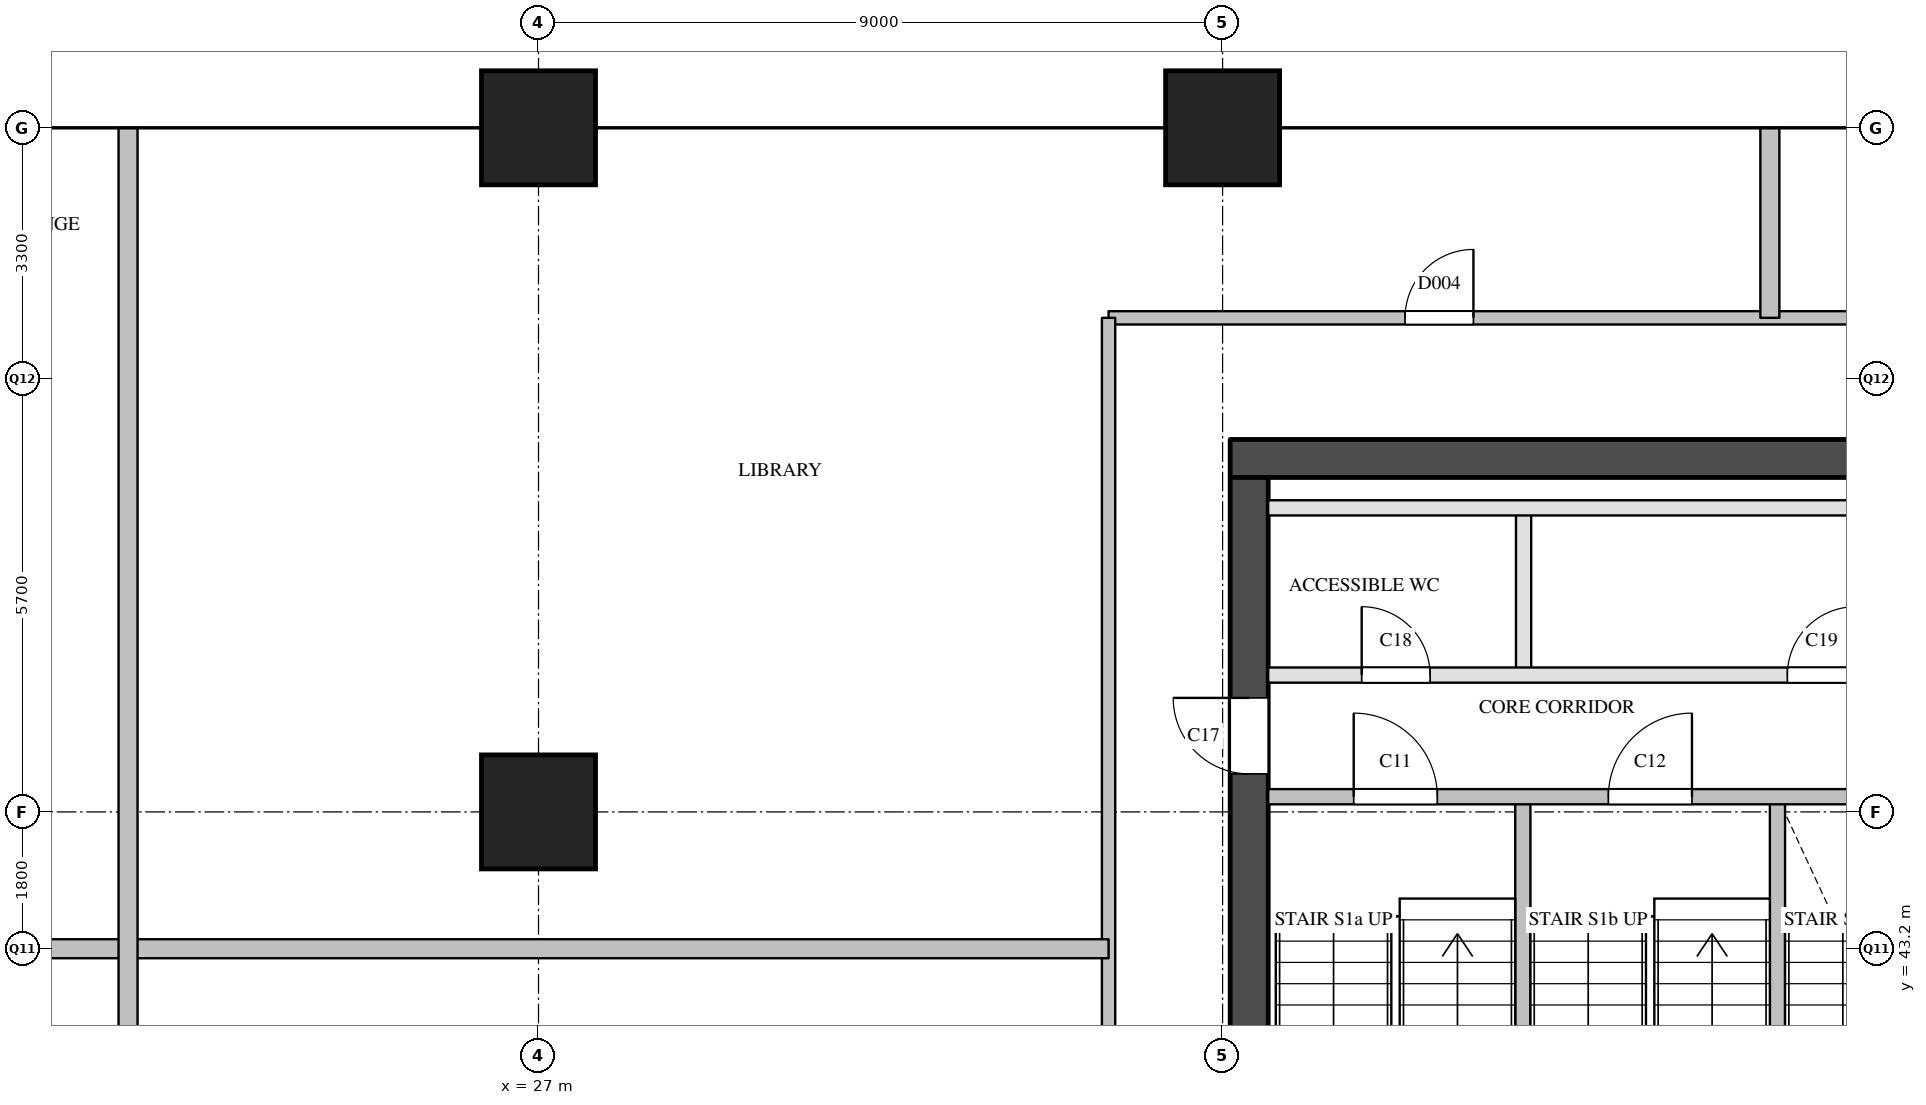
"""IFC4 building model, lengths in metres.
Left out: names, types, materials, properties, quantities, classifications, styles, units other than length and angle.
Written with IfcOpenShell. Run it as: python <this file> out.ifc"""

import sys

from ifc_helpers import new_model, si_unit, direction, frame, frame_2d, origin, origin_2d, place, context, subcontext, project, spatial, rectangle, extrude, element, fill, save


model = new_model("IFC4")
c1 = context("Model", 3, precision=1e-05, world=origin(), true_north=direction((0.0, 1.0)))
c2 = subcontext(c1, "Body", "Model", "MODEL_VIEW")
j1 = project(units=[si_unit("LENGTHUNIT", "METRE"), si_unit("PLANEANGLEUNIT", "RADIAN")], contexts=[c1])
p1 = place(None, origin())
s1 = spatial("IfcSite", under=j1, at=p1, CompositionType="ELEMENT")
p2 = place(p1, origin())
s2 = spatial("IfcBuilding", under=s1, at=p2, CompositionType="ELEMENT")
p3 = place(p2, frame((0.0, 0.0, 181.7)))
s3 = spatial("IfcBuildingStorey", under=s2, at=p3, CompositionType="ELEMENT", Elevation=181.7)
for number, where, z_axis, x_axis in (
    (1, (27.0, 45.0, 0.0), (0.0, 0.0, 1.0), (1.0, 0.0, 0.0)),
    (2, (27.0, 54.0, 0.0), (0.0, 0.0, 1.0), (1.0, 0.0, 0.0)),
    (3, (36.0, 54.0, 0.0), (0.0, 0.0, 1.0), (1.0, 0.0, 0.0)),
):
    element("IfcColumn", number, at=place(p3, frame(where, z_axis=z_axis, x_axis=x_axis)), inside=s3, PredefinedType="COLUMN", context=c2, shape_type="SweptSolid", body=[
        extrude(rectangle(XDim=1.5, YDim=1.5, at=origin_2d()), origin(), (0.0, 0.0, 1.0), 3.9),
    ])
p4 = place(p3, frame((36.1, 49.65, 0.0), z_axis=(0.0, 0.0, 1.0), x_axis=(1.0, 0.0, 0.0)))
e4 = element("IfcWall", 4, at=p4, inside=s3, PredefinedType="SHEAR", context=c2, shape_type="SweptSolid", body=[
    extrude(rectangle(XDim=12.2, YDim=0.5, at=frame_2d((6.1, 0.0))), origin(), (0.0, 0.0, 1.0), 3.6),
])
p5 = place(p3, frame((36.35, 29.1, 0.0), z_axis=(0.0, 0.0, 1.0), x_axis=(0.0, 1.0, 0.0)))
e5 = element("IfcWall", 5, at=p5, inside=s3, PredefinedType="SHEAR", context=c2, shape_type="SweptSolid", body=[
    extrude(rectangle(XDim=20.3, YDim=0.5, at=frame_2d((10.15, 0.0))), origin(), (0.0, 0.0, 1.0), 3.6),
])
p6 = place(p5, frame((3.6, 0.0, 0.0)))
e6 = element("IfcOpeningElement", 6, at=p6, cuts=e5, PredefinedType="OPENING", context=c2, shape_type="SweptSolid", body=[
    extrude(rectangle(XDim=1.8, YDim=2.1, at=frame_2d((0.9, 1.05))), frame((0.0, 0.26, 0.0), z_axis=(0.0, -1.0, 0.0), x_axis=(1.0, 0.0, 0.0)), (0.0, 0.0, 1.0), 0.52),
])
p7 = place(p5, frame((16.4, 0.0, 0.0)))
e7 = element("IfcOpeningElement", 7, at=p7, cuts=e5, PredefinedType="OPENING", context=c2, shape_type="SweptSolid", body=[
    extrude(rectangle(XDim=1.0, YDim=2.1, at=frame_2d((0.5, 1.05))), frame((0.0, 0.26, 0.0), z_axis=(0.0, -1.0, 0.0), x_axis=(1.0, 0.0, 0.0)), (0.0, 0.0, 1.0), 0.52),
])
p8 = place(p3, frame((39.95, 40.78, 0.0), z_axis=(0.0, 0.0, 1.0), x_axis=(0.0, 1.0, 0.0)))
e8 = element("IfcWall", 8, at=p8, inside=s3, PredefinedType="SOLIDWALL", context=c2, shape_type="SweptSolid", body=[
    extrude(rectangle(XDim=4.42, YDim=0.2, at=frame_2d((2.21, 0.0))), origin(), (0.0, 0.0, 1.0), 3.6),
])
p9 = place(p3, frame((39.96, 46.8, 0.0), z_axis=(0.0, 0.0, 1.0), x_axis=(0.0, 1.0, 0.0)))
e9 = element("IfcWall", 9, at=p9, inside=s3, PredefinedType="PARTITIONING", context=c2, shape_type="SweptSolid", body=[
    extrude(rectangle(XDim=2.2, YDim=0.2, at=frame_2d((1.1, 0.0))), origin(), (0.0, 0.0, 1.0), 3.6),
])
p10 = place(p3, frame((43.3, 40.78, 0.0), z_axis=(0.0, 0.0, 1.0), x_axis=(0.0, 1.0, 0.0)))
e10 = element("IfcWall", 10, at=p10, inside=s3, PredefinedType="SOLIDWALL", context=c2, shape_type="SweptSolid", body=[
    extrude(rectangle(XDim=4.42, YDim=0.2, at=frame_2d((2.21, 0.0))), origin(), (0.0, 0.0, 1.0), 3.6),
])
p11 = place(p3, frame((36.6, 45.2, 0.0), z_axis=(0.0, 0.0, 1.0), x_axis=(1.0, 0.0, 0.0)))
e11 = element("IfcWall", 11, at=p11, inside=s3, PredefinedType="SOLIDWALL", context=c2, shape_type="SweptSolid", body=[
    extrude(rectangle(XDim=10.05, YDim=0.2, at=frame_2d((5.025, 0.0))), origin(), (0.0, 0.0, 1.0), 3.6),
])
p12 = place(p11, frame((1.125, 0.0, 0.0)))
e12 = element("IfcOpeningElement", 12, at=p12, cuts=e11, PredefinedType="OPENING", context=c2, shape_type="SweptSolid", body=[
    extrude(rectangle(XDim=1.1, YDim=2.1, at=frame_2d((0.55, 1.05))), frame((0.0, 0.11, 0.0), z_axis=(0.0, -1.0, 0.0), x_axis=(1.0, 0.0, 0.0)), (0.0, 0.0, 1.0), 0.22),
])
p13 = place(p11, frame((4.475, 0.0, 0.0)))
e13 = element("IfcOpeningElement", 13, at=p13, cuts=e11, PredefinedType="OPENING", context=c2, shape_type="SweptSolid", body=[
    extrude(rectangle(XDim=1.1, YDim=2.1, at=frame_2d((0.55, 1.05))), frame((0.0, 0.11, 0.0), z_axis=(0.0, -1.0, 0.0), x_axis=(1.0, 0.0, 0.0)), (0.0, 0.0, 1.0), 0.22),
])
p14 = place(p11, frame((7.825, 0.0, 0.0)))
e14 = element("IfcOpeningElement", 14, at=p14, cuts=e11, PredefinedType="OPENING", context=c2, shape_type="SweptSolid", body=[
    extrude(rectangle(XDim=1.1, YDim=2.1, at=frame_2d((0.55, 1.05))), frame((0.0, 0.11, 0.0), z_axis=(0.0, -1.0, 0.0), x_axis=(1.0, 0.0, 0.0)), (0.0, 0.0, 1.0), 0.22),
])
p15 = place(p3, frame((36.6, 46.8, 0.0), z_axis=(0.0, 0.0, 1.0), x_axis=(1.0, 0.0, 0.0)))
e15 = element("IfcWall", 15, at=p15, inside=s3, PredefinedType="PARTITIONING", context=c2, shape_type="SweptSolid", body=[
    extrude(rectangle(XDim=11.2, YDim=0.2, at=frame_2d((5.6, 0.0))), origin(), (0.0, 0.0, 1.0), 3.6),
])
p16 = place(p15, frame((1.23, 0.0, 0.0)))
e16 = element("IfcOpeningElement", 16, at=p16, cuts=e15, PredefinedType="OPENING", context=c2, shape_type="SweptSolid", body=[
    extrude(rectangle(XDim=0.9, YDim=2.1, at=frame_2d((0.45, 1.05))), frame((0.0, 0.11, 0.0), z_axis=(0.0, -1.0, 0.0), x_axis=(1.0, 0.0, 0.0)), (0.0, 0.0, 1.0), 0.22),
])
p17 = place(p15, frame((6.83, 0.0, 0.0)))
e17 = element("IfcOpeningElement", 17, at=p17, cuts=e15, PredefinedType="OPENING", context=c2, shape_type="SweptSolid", body=[
    extrude(rectangle(XDim=0.9, YDim=2.1, at=frame_2d((0.45, 1.05))), frame((0.0, 0.11, 0.0), z_axis=(0.0, -1.0, 0.0), x_axis=(1.0, 0.0, 0.0)), (0.0, 0.0, 1.0), 0.22),
])
p18 = place(p3, frame((36.6, 49.0, 0.0), z_axis=(0.0, 0.0, 1.0), x_axis=(1.0, 0.0, 0.0)))
e18 = element("IfcWall", 18, at=p18, inside=s3, PredefinedType="PARTITIONING", context=c2, shape_type="SweptSolid", body=[
    extrude(rectangle(XDim=11.2, YDim=0.2, at=frame_2d((5.6, 0.0))), origin(), (0.0, 0.0, 1.0), 3.6),
])
p19 = place(p3, frame((34.5, 51.5, 0.0), z_axis=(0.0, 0.0, 1.0), x_axis=(1.0, 0.0, 0.0)))
e19 = element("IfcWall", 19, at=p19, inside=s3, PredefinedType="PARTITIONING", context=c2, shape_type="SweptSolid", body=[
    extrude(rectangle(XDim=15.4, YDim=0.175, at=frame_2d((7.7, 0.0))), origin(), (0.0, 0.0, 1.0), 3.6),
])
p20 = place(p19, frame((3.9, 0.0, 0.0)))
e20 = element("IfcOpeningElement", 20, at=p20, cuts=e19, PredefinedType="OPENING", context=c2, shape_type="SweptSolid", body=[
    extrude(rectangle(XDim=0.9, YDim=2.1, at=frame_2d((0.45, 1.05))), frame((0.0, 0.097, 0.0), z_axis=(0.0, -1.0, 0.0), x_axis=(1.0, 0.0, 0.0)), (0.0, 0.0, 1.0), 0.195),
])
p21 = place(p3, frame((34.5, 28.5, 0.0), z_axis=(0.0, 0.0, 1.0), x_axis=(0.0, 1.0, 0.0)))
e21 = element("IfcWall", 21, at=p21, inside=s3, PredefinedType="PARTITIONING", context=c2, shape_type="SweptSolid", body=[
    extrude(rectangle(XDim=23.0, YDim=0.175, at=frame_2d((11.5, 0.0))), origin(), (0.0, 0.0, 1.0), 3.6),
])
p22 = place(p21, frame((6.9, 0.0, 0.0)))
e22 = element("IfcOpeningElement", 22, at=p22, cuts=e21, PredefinedType="OPENING", context=c2, shape_type="SweptSolid", body=[
    extrude(rectangle(XDim=0.9, YDim=2.1, at=frame_2d((0.45, 1.05))), frame((0.0, 0.097, 0.0), z_axis=(0.0, -1.0, 0.0), x_axis=(1.0, 0.0, 0.0)), (0.0, 0.0, 1.0), 0.195),
])
p23 = place(p3, frame((19.5, 43.2, 0.0), z_axis=(0.0, 0.0, 1.0), x_axis=(1.0, 0.0, 0.0)))
e23 = element("IfcWall", 23, at=p23, inside=s3, PredefinedType="PARTITIONING", context=c2, shape_type="SweptSolid", body=[
    extrude(rectangle(XDim=15.0, YDim=0.25, at=frame_2d((7.5, 0.0))), origin(), (0.0, 0.0, 1.0), 2.6),
])
p24 = place(p3, frame((21.6, 27.0, 0.0), z_axis=(0.0, 0.0, 1.0), x_axis=(0.0, 1.0, 0.0)))
e24 = element("IfcWall", 24, at=p24, inside=s3, PredefinedType="PARTITIONING", context=c2, shape_type="SweptSolid", body=[
    extrude(rectangle(XDim=27.0, YDim=0.25, at=frame_2d((13.5, 0.0))), origin(), (0.0, 0.0, 1.0), 2.6),
])
p25 = place(p3, frame((43.2, 51.5, 0.0), z_axis=(0.0, 0.0, 1.0), x_axis=(0.0, 1.0, 0.0)))
e25 = element("IfcWall", 25, at=p25, inside=s3, PredefinedType="PARTITIONING", context=c2, shape_type="SweptSolid", body=[
    extrude(rectangle(XDim=2.5, YDim=0.25, at=frame_2d((1.25, 0.0))), origin(), (0.0, 0.0, 1.0), 2.6),
])
p26 = place(p12, origin())
e26 = element("IfcDoor", 26, at=p26, inside=s3, OperationType="SINGLE_SWING_LEFT", PredefinedType="DOOR", context=c2, shape_type="SweptSolid", body=[
    extrude(rectangle(XDim=1.1, YDim=2.1, at=frame_2d((0.55, 1.05))), frame((0.0, 0.025, 0.0), z_axis=(0.0, -1.0, 0.0), x_axis=(1.0, 0.0, 0.0)), (0.0, 0.0, 1.0), 0.05),
])
fill(e12, e26)
p27 = place(p13, origin())
e27 = element("IfcDoor", 27, at=p27, inside=s3, OperationType="SINGLE_SWING_RIGHT", PredefinedType="DOOR", context=c2, shape_type="SweptSolid", body=[
    extrude(rectangle(XDim=1.1, YDim=2.1, at=frame_2d((0.55, 1.05))), frame((0.0, 0.025, 0.0), z_axis=(0.0, -1.0, 0.0), x_axis=(1.0, 0.0, 0.0)), (0.0, 0.0, 1.0), 0.05),
])
fill(e13, e27)
p28 = place(p7, origin())
e28 = element("IfcDoor", 28, at=p28, inside=s3, OperationType="SINGLE_SWING_RIGHT", PredefinedType="DOOR", context=c2, shape_type="SweptSolid", body=[
    extrude(rectangle(XDim=1.0, YDim=2.1, at=frame_2d((0.5, 1.05))), frame((0.0, 0.025, 0.0), z_axis=(0.0, -1.0, 0.0), x_axis=(1.0, 0.0, 0.0)), (0.0, 0.0, 1.0), 0.05),
])
fill(e7, e28)
p29 = place(p16, origin())
e29 = element("IfcDoor", 29, at=p29, inside=s3, OperationType="SINGLE_SWING_LEFT", PredefinedType="DOOR", context=c2, shape_type="SweptSolid", body=[
    extrude(rectangle(XDim=0.9, YDim=2.1, at=frame_2d((0.45, 1.05))), frame((0.0, 0.025, 0.0), z_axis=(0.0, -1.0, 0.0), x_axis=(1.0, 0.0, 0.0)), (0.0, 0.0, 1.0), 0.05),
])
fill(e16, e29)
p30 = place(p17, origin())
e30 = element("IfcDoor", 30, at=p30, inside=s3, OperationType="SINGLE_SWING_RIGHT", PredefinedType="DOOR", context=c2, shape_type="SweptSolid", body=[
    extrude(rectangle(XDim=0.9, YDim=2.1, at=frame_2d((0.45, 1.05))), frame((0.0, 0.025, 0.0), z_axis=(0.0, -1.0, 0.0), x_axis=(1.0, 0.0, 0.0)), (0.0, 0.0, 1.0), 0.05),
])
fill(e17, e30)
p31 = place(p20, origin())
e31 = element("IfcDoor", 31, at=p31, inside=s3, OperationType="SINGLE_SWING_RIGHT", PredefinedType="DOOR", context=c2, shape_type="SweptSolid", body=[
    extrude(rectangle(XDim=0.9, YDim=2.1, at=frame_2d((0.45, 1.05))), frame((0.0, 0.025, 0.0), z_axis=(0.0, -1.0, 0.0), x_axis=(1.0, 0.0, 0.0)), (0.0, 0.0, 1.0), 0.05),
])
fill(e20, e31)
save(model, sys.argv[1])
